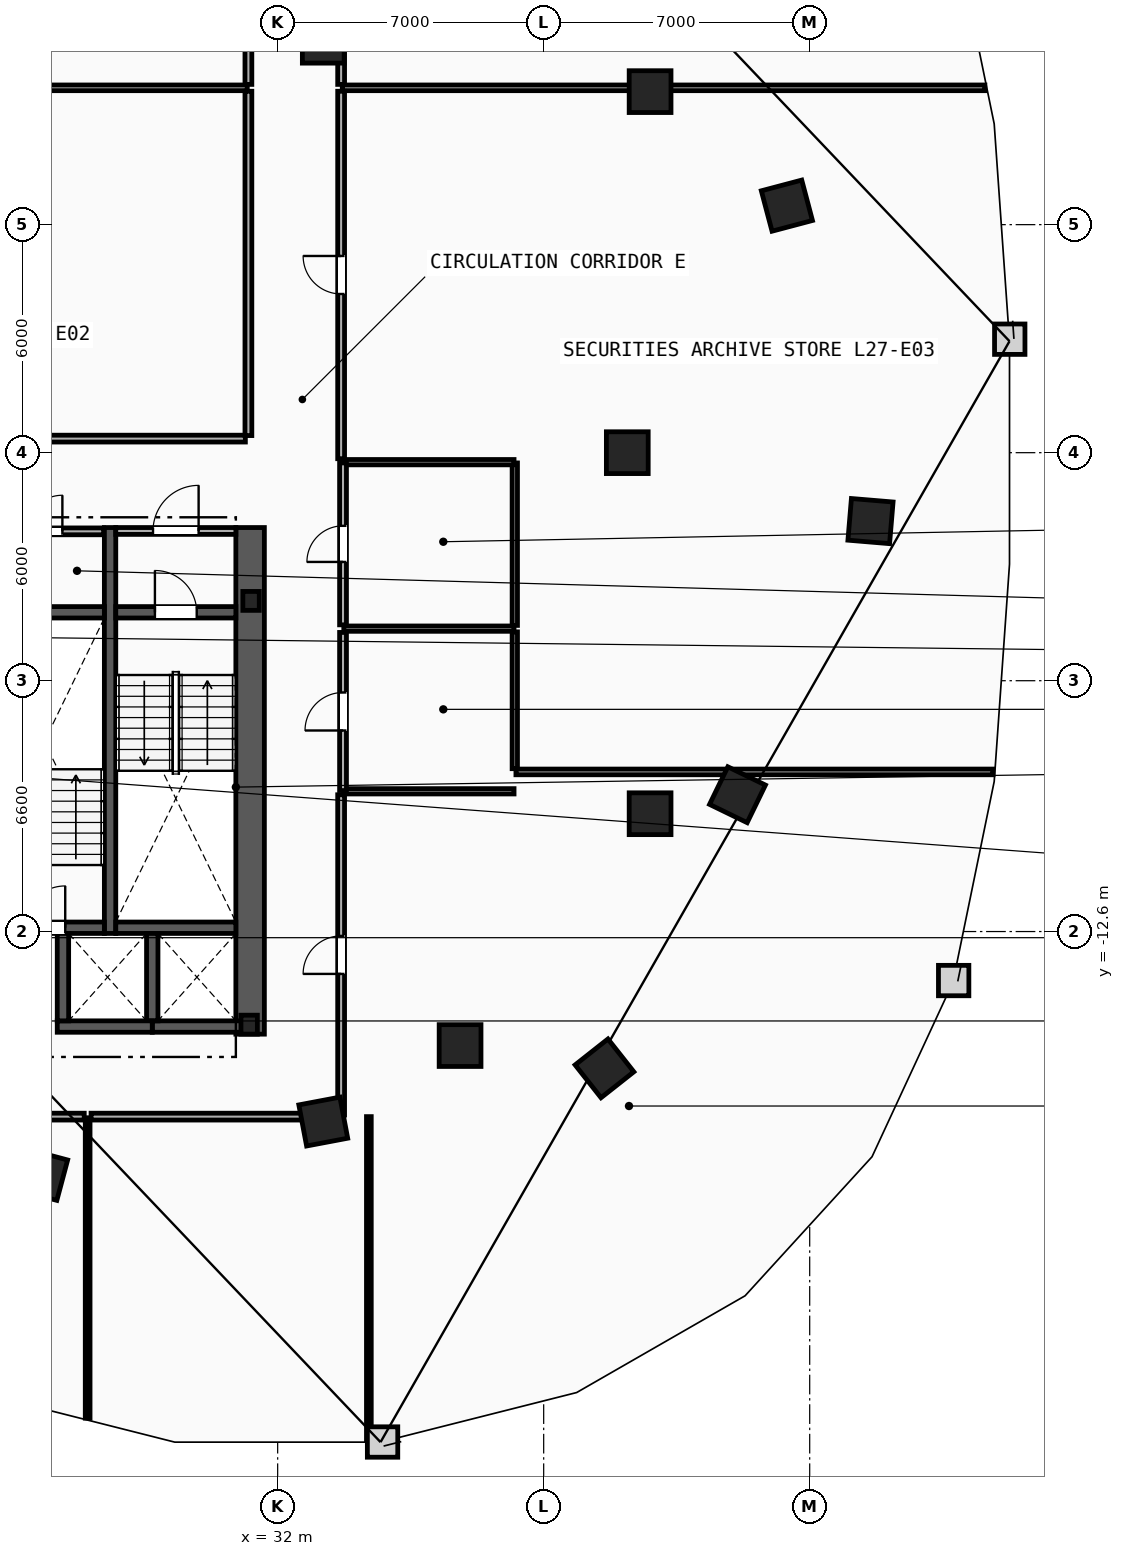
"""IFC4 building model, lengths in metres.
Left out: names, types, materials, properties, quantities, classifications, styles, units other than length and angle.
Written with IfcOpenShell. Run it as: python <this file> out.ifc"""

import sys

from ifc_helpers import new_model, si_unit, direction, frame, frame_2d, origin, origin_2d, place, context, subcontext, project, spatial, rectangle, i_section, extrude, element, fill, save


model = new_model("IFC4")
c1 = context("Model", 3, precision=1e-05, world=origin(), true_north=direction((0.0, 1.0)))
c2 = subcontext(c1, "Body", "Model", "MODEL_VIEW")
j1 = project(units=[si_unit("LENGTHUNIT", "METRE"), si_unit("PLANEANGLEUNIT", "RADIAN")], contexts=[c1])
p1 = place(None, origin())
s1 = spatial("IfcSite", under=j1, at=p1, CompositionType="ELEMENT")
p2 = place(p1, origin())
s2 = spatial("IfcBuilding", under=s1, at=p2, CompositionType="ELEMENT")
p3 = place(p2, frame((0.0, 0.0, 107.0)))
s3 = spatial("IfcBuildingStorey", under=s2, at=p3, CompositionType="ELEMENT", Elevation=107.0)
for number, where, z_axis, x_axis in (
    (1, (31.3, -3.9, 0.0), (0.0, 0.0, 1.0), (1.0, 0.0, 0.0)),
    (2, (31.25, -15.05, 0.0), (0.0, 0.0, 1.0), (1.0, 0.0, 0.0)),
):
    element("IfcColumn", number, at=place(p3, frame(where, z_axis=z_axis, x_axis=x_axis)), inside=s3, PredefinedType="COLUMN", context=c2, shape_type="SweptSolid", body=[
        extrude(i_section(OverallWidth=0.432, OverallDepth=0.498, WebThickness=0.056, FlangeThickness=0.089, FilletRadius=0.018, at=origin_2d()), origin(), (0.0, 0.0, 1.0), 3.6),
    ])
for number, where, z_axis, x_axis in (
    (3, (41.2, 0.0, 0.0), (0.0, 0.0, 1.0), (1.0, 0.0, 0.0)),
    (4, (41.8, -9.5, 0.0), (0.0, 0.0, 1.0), (1.0, 0.0, 0.0)),
    (5, (36.8, -15.6, 0.0), (0.0, 0.0, 1.0), (1.0, 0.0, 0.0)),
    (6, (41.8, 9.5, 0.0), (0.0, 0.0, 1.0), (1.0, 0.0, 0.0)),
    (7, (33.2, 10.8, 0.0), (0.0, 0.0, 1.0), (1.0, 0.0, 0.0)),
    (8, (25.8, -19.0, 0.0), (0.0, 0.0, 1.0), (0.966, -0.259, 0.0)),
    (9, (33.2, -17.6, 0.0), (0.0, 0.0, 1.0), (0.983, 0.186, 0.0)),
    (10, (40.6, -16.2, 0.0), (0.0, 0.0, 1.0), (0.785, 0.619, 0.0)),
    (11, (44.1, -9.0, 0.0), (0.0, 0.0, 1.0), (0.437, 0.899, 0.0)),
    (12, (47.6, -1.8, 0.0), (0.0, 0.0, 1.0), (0.084, 0.997, 0.0)),
    (13, (45.4, 6.5, 0.0), (0.0, 0.0, 1.0), (-0.256, 0.967, 0.0)),
):
    element("IfcColumn", number, at=place(p3, frame(where, z_axis=z_axis, x_axis=x_axis)), inside=s3, PredefinedType="COLUMN", context=c2, shape_type="SweptSolid", body=[
        extrude(rectangle(XDim=1.1, YDim=1.1, at=origin_2d()), origin(), (0.0, 0.0, 1.0), 3.6),
    ])
p4 = place(p3, frame((31.275, -15.3, 0.0), z_axis=(0.0, 0.0, 1.0), x_axis=(0.0, 1.0, 0.0)))
e14 = element("IfcWall", 14, at=p4, inside=s3, PredefinedType="SHEAR", context=c2, shape_type="SweptSolid", body=[
    extrude(rectangle(XDim=13.33, YDim=0.75, at=frame_2d((6.665, 0.0))), origin(), (0.0, 0.0, 1.0), 3.3),
])
p5 = place(p3, frame((27.59, -12.65, 0.0), z_axis=(0.0, 0.0, 1.0), x_axis=(0.0, 1.0, 0.0)))
e15 = element("IfcWall", 15, at=p5, inside=s3, PredefinedType="SHEAR", context=c2, shape_type="SweptSolid", body=[
    extrude(rectangle(XDim=10.68, YDim=0.3, at=frame_2d((5.34, 0.0))), origin(), (0.0, 0.0, 1.0), 3.3),
])
p6 = place(p3, frame((27.74, -4.2, 0.0), z_axis=(0.0, 0.0, 1.0), x_axis=(1.0, 0.0, 0.0)))
e16 = element("IfcWall", 16, at=p6, inside=s3, PredefinedType="SHEAR", context=c2, shape_type="SweptSolid", body=[
    extrude(rectangle(XDim=3.16, YDim=0.3, at=frame_2d((1.58, 0.0))), origin(), (0.0, 0.0, 1.0), 3.3),
])
p7 = place(p6, frame((1.03, 0.0, 0.0)))
e17 = element("IfcOpeningElement", 17, at=p7, cuts=e16, PredefinedType="OPENING", context=c2, shape_type="SweptSolid", body=[
    extrude(rectangle(XDim=1.1, YDim=2.15, at=frame_2d((0.55, 1.075))), frame((0.0, 0.16, 0.0), z_axis=(0.0, -1.0, 0.0), x_axis=(1.0, 0.0, 0.0)), (0.0, 0.0, 1.0), 0.32),
])
p8 = place(p3, frame((27.74, -12.5, 0.0), z_axis=(0.0, 0.0, 1.0), x_axis=(1.0, 0.0, 0.0)))
e18 = element("IfcWall", 18, at=p8, inside=s3, PredefinedType="SHEAR", context=c2, shape_type="SweptSolid", body=[
    extrude(rectangle(XDim=3.16, YDim=0.3, at=frame_2d((1.58, 0.0))), origin(), (0.0, 0.0, 1.0), 3.3),
])
p9 = place(p3, frame((24.28, -12.5, 0.0), z_axis=(0.0, 0.0, 1.0), x_axis=(1.0, 0.0, 0.0)))
e19 = element("IfcWall", 19, at=p9, inside=s3, PredefinedType="SHEAR", context=c2, shape_type="SweptSolid", body=[
    extrude(rectangle(XDim=3.16, YDim=0.3, at=frame_2d((1.58, 0.0))), origin(), (0.0, 0.0, 1.0), 3.3),
])
p10 = place(p9, frame((1.03, 0.0, 0.0)))
e20 = element("IfcOpeningElement", 20, at=p10, cuts=e19, PredefinedType="OPENING", context=c2, shape_type="SweptSolid", body=[
    extrude(rectangle(XDim=1.1, YDim=2.15, at=frame_2d((0.55, 1.075))), frame((0.0, 0.16, 0.0), z_axis=(0.0, -1.0, 0.0), x_axis=(1.0, 0.0, 0.0)), (0.0, 0.0, 1.0), 0.32),
])
p11 = place(p3, frame((24.28, -4.2, 0.0), z_axis=(0.0, 0.0, 1.0), x_axis=(1.0, 0.0, 0.0)))
e21 = element("IfcWall", 21, at=p11, inside=s3, PredefinedType="SHEAR", context=c2, shape_type="SweptSolid", body=[
    extrude(rectangle(XDim=3.16, YDim=0.3, at=frame_2d((1.58, 0.0))), origin(), (0.0, 0.0, 1.0), 3.3),
])
p12 = place(p3, frame((27.74, -2.06, 0.0), z_axis=(0.0, 0.0, 1.0), x_axis=(1.0, 0.0, 0.0)))
e22 = element("IfcWall", 22, at=p12, inside=s3, PredefinedType="PARTITIONING", context=c2, shape_type="SweptSolid", body=[
    extrude(rectangle(XDim=3.16, YDim=0.18, at=frame_2d((1.58, 0.0))), origin(), (0.0, 0.0, 1.0), 3.3),
])
p13 = place(p12, frame((0.98, 0.0, 0.0)))
e23 = element("IfcOpeningElement", 23, at=p13, cuts=e22, PredefinedType="OPENING", context=c2, shape_type="SweptSolid", body=[
    extrude(rectangle(XDim=1.2, YDim=2.15, at=frame_2d((0.6, 1.075))), frame((0.0, 0.1, 0.0), z_axis=(0.0, -1.0, 0.0), x_axis=(1.0, 0.0, 0.0)), (0.0, 0.0, 1.0), 0.2),
])
p14 = place(p3, frame((28.7, -15.1, 0.0), z_axis=(0.0, 0.0, 1.0), x_axis=(1.0, 0.0, 0.0)))
e24 = element("IfcWall", 24, at=p14, inside=s3, PredefinedType="SHEAR", context=c2, shape_type="SweptSolid", body=[
    extrude(rectangle(XDim=2.5, YDim=0.3, at=frame_2d((1.25, 0.0))), origin(), (0.0, 0.0, 1.0), 3.3),
])
p15 = place(p3, frame((28.7, -14.95, 0.0), z_axis=(0.0, 0.0, 1.0), x_axis=(0.0, 1.0, 0.0)))
e25 = element("IfcWall", 25, at=p15, inside=s3, PredefinedType="SHEAR", context=c2, shape_type="SweptSolid", body=[
    extrude(rectangle(XDim=2.3, YDim=0.3, at=frame_2d((1.15, 0.0))), origin(), (0.0, 0.0, 1.0), 3.3),
])
p16 = place(p3, frame((26.2, -15.1, 0.0), z_axis=(0.0, 0.0, 1.0), x_axis=(1.0, 0.0, 0.0)))
e26 = element("IfcWall", 26, at=p16, inside=s3, PredefinedType="SHEAR", context=c2, shape_type="SweptSolid", body=[
    extrude(rectangle(XDim=2.5, YDim=0.3, at=frame_2d((1.25, 0.0))), origin(), (0.0, 0.0, 1.0), 3.3),
])
p17 = place(p3, frame((26.35, -14.95, 0.0), z_axis=(0.0, 0.0, 1.0), x_axis=(0.0, 1.0, 0.0)))
e27 = element("IfcWall", 27, at=p17, inside=s3, PredefinedType="SHEAR", context=c2, shape_type="SweptSolid", body=[
    extrude(rectangle(XDim=2.3, YDim=0.3, at=frame_2d((1.15, 0.0))), origin(), (0.0, 0.0, 1.0), 3.3),
])
p18 = place(p3, frame((24.3, -2.07, 0.0), z_axis=(0.0, 0.0, 1.0), x_axis=(1.0, 0.0, 0.0)))
e28 = element("IfcWall", 28, at=p18, inside=s3, PredefinedType="PARTITIONING", context=c2, shape_type="SweptSolid", body=[
    extrude(rectangle(XDim=3.12, YDim=0.18, at=frame_2d((1.56, 0.0))), origin(), (0.0, 0.0, 1.0), 3.3),
])
p19 = place(p18, frame((1.085, 0.0, 0.0)))
e29 = element("IfcOpeningElement", 29, at=p19, cuts=e28, PredefinedType="OPENING", context=c2, shape_type="SweptSolid", body=[
    extrude(rectangle(XDim=0.95, YDim=2.1, at=frame_2d((0.475, 1.05))), frame((0.0, 0.1, 0.0), z_axis=(0.0, -1.0, 0.0), x_axis=(1.0, 0.0, 0.0)), (0.0, 0.0, 1.0), 0.2),
])
p20 = place(p3, frame((38.24, -8.315, 0.0), z_axis=(0.0, 0.0, 1.0), x_axis=(0.0, 1.0, 0.0)))
e30 = element("IfcWall", 30, at=p20, inside=s3, PredefinedType="PARTITIONING", context=c2, shape_type="SweptSolid", body=[
    extrude(rectangle(XDim=3.6, YDim=0.14, at=frame_2d((1.8, 0.0))), origin(), (0.0, 0.0, 1.0), 3.3),
])
p21 = place(p3, frame((38.24, -4.545, 0.0), z_axis=(0.0, 0.0, 1.0), x_axis=(0.0, 1.0, 0.0)))
e31 = element("IfcWall", 31, at=p21, inside=s3, PredefinedType="PARTITIONING", context=c2, shape_type="SweptSolid", body=[
    extrude(rectangle(XDim=4.275, YDim=0.14, at=frame_2d((2.137, 0.0))), origin(), (0.0, 0.0, 1.0), 3.3),
])
for number, where, z_axis, x_axis in (
    (32, (33.74, -0.25, 0.0), (0.0, 0.0, 1.0), (1.0, 0.0, 0.0)),
    (33, (33.74, -4.63, 0.0), (0.0, 0.0, 1.0), (1.0, 0.0, 0.0)),
    (34, (33.74, -8.91, 0.0), (0.0, 0.0, 1.0), (1.0, 0.0, 0.0)),
):
    element("IfcWall", number, at=place(p3, frame(where, z_axis=z_axis, x_axis=x_axis)), inside=s3, PredefinedType="PARTITIONING", context=c2, shape_type="SweptSolid", body=[
        extrude(rectangle(XDim=4.48, YDim=0.14, at=frame_2d((2.24, 0.0))), origin(), (0.0, 0.0, 1.0), 3.3),
    ])
p22 = place(p3, frame((33.72, -4.53, 0.0), z_axis=(0.0, 0.0, 1.0), x_axis=(0.0, 1.0, 0.0)))
e35 = element("IfcWall", 35, at=p22, inside=s3, PredefinedType="PARTITIONING", context=c2, shape_type="SweptSolid", body=[
    extrude(rectangle(XDim=4.26, YDim=0.18, at=frame_2d((2.13, 0.0))), origin(), (0.0, 0.0, 1.0), 3.3),
])
p23 = place(p22, frame((1.655, 0.0, 0.0)))
e36 = element("IfcOpeningElement", 36, at=p23, cuts=e35, PredefinedType="OPENING", context=c2, shape_type="SweptSolid", body=[
    extrude(rectangle(XDim=0.95, YDim=2.1, at=frame_2d((0.475, 1.05))), frame((0.0, 0.1, 0.0), z_axis=(0.0, -1.0, 0.0), x_axis=(1.0, 0.0, 0.0)), (0.0, 0.0, 1.0), 0.2),
])
p24 = place(p3, frame((33.72, -8.89, 0.0), z_axis=(0.0, 0.0, 1.0), x_axis=(0.0, 1.0, 0.0)))
e37 = element("IfcWall", 37, at=p24, inside=s3, PredefinedType="PARTITIONING", context=c2, shape_type="SweptSolid", body=[
    extrude(rectangle(XDim=4.16, YDim=0.18, at=frame_2d((2.08, 0.0))), origin(), (0.0, 0.0, 1.0), 3.3),
])
p25 = place(p24, frame((1.58, 0.0, 0.0)))
e38 = element("IfcOpeningElement", 38, at=p25, cuts=e37, PredefinedType="OPENING", context=c2, shape_type="SweptSolid", body=[
    extrude(rectangle(XDim=1.0, YDim=2.15, at=frame_2d((0.5, 1.075))), frame((0.0, 0.1, 0.0), z_axis=(0.0, -1.0, 0.0), x_axis=(1.0, 0.0, 0.0)), (0.0, 0.0, 1.0), 0.2),
])
p26 = place(p3, frame((13.39, 9.6, 0.0), z_axis=(0.0, 0.0, 1.0), x_axis=(1.0, 0.0, 0.0)))
e39 = element("IfcWall", 39, at=p26, inside=s3, PredefinedType="PARTITIONING", context=c2, shape_type="SweptSolid", body=[
    extrude(rectangle(XDim=17.81, YDim=0.15, at=frame_2d((8.905, 0.0))), origin(), (0.0, 0.0, 1.0), 2.605),
])
p27 = place(p3, frame((33.7, 9.6, 0.0), z_axis=(0.0, 0.0, 1.0), x_axis=(1.0, 0.0, 0.0)))
e40 = element("IfcWall", 40, at=p27, inside=s3, PredefinedType="PARTITIONING", context=c2, shape_type="SweptSolid", body=[
    extrude(rectangle(XDim=16.91, YDim=0.15, at=frame_2d((8.455, 0.0))), origin(), (0.0, 0.0, 1.0), 2.605),
])
p28 = place(p3, frame((38.27, -8.4, 0.0), z_axis=(0.0, 0.0, 1.0), x_axis=(1.0, 0.0, 0.0)))
e41 = element("IfcWall", 41, at=p28, inside=s3, PredefinedType="PARTITIONING", context=c2, shape_type="SweptSolid", body=[
    extrude(rectangle(XDim=12.553, YDim=0.15, at=frame_2d((6.276, 0.0))), origin(), (0.0, 0.0, 1.0), 3.3),
])
p29 = place(p3, frame((27.0, -25.404, 0.0), z_axis=(0.0, 0.0, 1.0), x_axis=(0.0, 1.0, 0.0)))
e42 = element("IfcWall", 42, at=p29, inside=s3, PredefinedType="PARTITIONING", context=c2, shape_type="SweptSolid", body=[
    extrude(rectangle(XDim=7.904, YDim=0.125, at=frame_2d((3.952, 0.0))), origin(), (0.0, 0.0, 1.0), 3.3),
])
p30 = place(p3, frame((34.4, -25.985, 0.0), z_axis=(0.0, 0.0, 1.0), x_axis=(0.0, 1.0, 0.0)))
e43 = element("IfcWall", 43, at=p30, inside=s3, PredefinedType="PARTITIONING", context=c2, shape_type="SweptSolid", body=[
    extrude(rectangle(XDim=8.515, YDim=0.125, at=frame_2d((4.258, 0.0))), origin(), (0.0, 0.0, 1.0), 3.3),
])
p31 = place(p3, frame((33.67, -17.428, 0.0), z_axis=(0.0, 0.0, 1.0), x_axis=(0.0, 1.0, 0.0)))
e44 = element("IfcWall", 44, at=p31, inside=s3, PredefinedType="PARTITIONING", context=c2, shape_type="SweptSolid", body=[
    extrude(rectangle(XDim=8.427, YDim=0.18, at=frame_2d((4.213, 0.0))), origin(), (0.0, 0.0, 1.0), 3.3),
])
p32 = place(p31, frame((3.713, 0.0, 0.0)))
e45 = element("IfcOpeningElement", 45, at=p32, cuts=e44, PredefinedType="OPENING", context=c2, shape_type="SweptSolid", body=[
    extrude(rectangle(XDim=1.0, YDim=2.15, at=frame_2d((0.5, 1.075))), frame((0.0, 0.1, 0.0), z_axis=(0.0, -1.0, 0.0), x_axis=(1.0, 0.0, 0.0)), (0.0, 0.0, 1.0), 0.2),
])
p33 = place(p3, frame((27.09, -17.47, 0.0), z_axis=(0.0, 0.0, 1.0), x_axis=(1.0, 0.0, 0.0)))
e46 = element("IfcWall", 46, at=p33, inside=s3, PredefinedType="PARTITIONING", context=c2, shape_type="SweptSolid", body=[
    extrude(rectangle(XDim=6.538, YDim=0.18, at=frame_2d((3.269, 0.0))), origin(), (0.0, 0.0, 1.0), 3.3),
])
p34 = place(p3, frame((31.15, 0.37, 0.0), z_axis=(0.0, 0.0, 1.0), x_axis=(-1.0, 0.0, 0.0)))
e47 = element("IfcWall", 47, at=p34, inside=s3, PredefinedType="PARTITIONING", context=c2, shape_type="SweptSolid", body=[
    extrude(rectangle(XDim=14.328, YDim=0.18, at=frame_2d((7.164, 0.0))), origin(), (0.0, 0.0, 1.0), 3.3),
])
p35 = place(p34, frame((6.664, 0.0, 0.0)))
e48 = element("IfcOpeningElement", 48, at=p35, cuts=e47, PredefinedType="OPENING", context=c2, shape_type="SweptSolid", body=[
    extrude(rectangle(XDim=1.0, YDim=2.15, at=frame_2d((0.5, 1.075))), frame((0.0, 0.1, 0.0), z_axis=(0.0, -1.0, 0.0), x_axis=(1.0, 0.0, 0.0)), (0.0, 0.0, 1.0), 0.2),
])
p36 = place(p3, frame((16.822, -17.47, 0.0), z_axis=(0.0, 0.0, 1.0), x_axis=(1.0, 0.0, 0.0)))
e49 = element("IfcWall", 49, at=p36, inside=s3, PredefinedType="PARTITIONING", context=c2, shape_type="SweptSolid", body=[
    extrude(rectangle(XDim=10.088, YDim=0.18, at=frame_2d((5.044, 0.0))), origin(), (0.0, 0.0, 1.0), 3.3),
])
p37 = place(p3, frame((31.23, 9.51, 0.0), z_axis=(0.0, 0.0, 1.0), x_axis=(0.0, -1.0, 0.0)))
e50 = element("IfcWall", 50, at=p37, inside=s3, PredefinedType="PARTITIONING", context=c2, shape_type="SweptSolid", body=[
    extrude(rectangle(XDim=9.06, YDim=0.18, at=frame_2d((4.53, 0.0))), origin(), (0.0, 0.0, 1.0), 3.3),
])
p38 = place(p3, frame((33.67, -0.159, 0.0), z_axis=(0.0, 0.0, 1.0), x_axis=(0.0, 1.0, 0.0)))
e51 = element("IfcWall", 51, at=p38, inside=s3, PredefinedType="PARTITIONING", context=c2, shape_type="SweptSolid", body=[
    extrude(rectangle(XDim=9.669, YDim=0.18, at=frame_2d((4.834, 0.0))), origin(), (0.0, 0.0, 1.0), 3.3),
])
p39 = place(p38, frame((4.334, 0.0, 0.0)))
e52 = element("IfcOpeningElement", 52, at=p39, cuts=e51, PredefinedType="OPENING", context=c2, shape_type="SweptSolid", body=[
    extrude(rectangle(XDim=1.0, YDim=2.15, at=frame_2d((0.5, 1.075))), frame((0.0, 0.1, 0.0), z_axis=(0.0, -1.0, 0.0), x_axis=(1.0, 0.0, 0.0)), (0.0, 0.0, 1.0), 0.2),
])
for number, where, z_axis, x_axis in (
    (53, (33.67, 9.69, 0.0), (0.0, 0.0, 1.0), (0.0, 1.0, 0.0)),
    (54, (31.23, 11.4, 0.0), (0.0, 0.0, 1.0), (0.0, -1.0, 0.0)),
):
    element("IfcWall", number, at=place(p3, frame(where, z_axis=z_axis, x_axis=x_axis)), inside=s3, PredefinedType="PARTITIONING", context=c2, shape_type="SweptSolid", body=[
        extrude(rectangle(XDim=1.71, YDim=0.18, at=frame_2d((0.855, 0.0))), origin(), (0.0, 0.0, 1.0), 3.3),
    ])
p40 = place(p7, origin())
e55 = element("IfcDoor", 55, at=p40, inside=s3, OperationType="SINGLE_SWING_LEFT", PredefinedType="DOOR", context=c2, shape_type="SweptSolid", body=[
    extrude(rectangle(XDim=1.1, YDim=2.15, at=frame_2d((0.55, 1.075))), frame((0.0, 0.025, 0.0), z_axis=(0.0, -1.0, 0.0), x_axis=(1.0, 0.0, 0.0)), (0.0, 0.0, 1.0), 0.05),
])
fill(e17, e55)
p41 = place(p10, origin())
e56 = element("IfcDoor", 56, at=p41, inside=s3, OperationType="SINGLE_SWING_RIGHT", PredefinedType="DOOR", context=c2, shape_type="SweptSolid", body=[
    extrude(rectangle(XDim=1.1, YDim=2.15, at=frame_2d((0.55, 1.075))), frame((0.0, 0.025, 0.0), z_axis=(0.0, -1.0, 0.0), x_axis=(1.0, 0.0, 0.0)), (0.0, 0.0, 1.0), 0.05),
])
fill(e20, e56)
p42 = place(p13, origin())
e57 = element("IfcDoor", 57, at=p42, inside=s3, OperationType="SINGLE_SWING_RIGHT", PredefinedType="DOOR", context=c2, shape_type="SweptSolid", body=[
    extrude(rectangle(XDim=1.2, YDim=2.15, at=frame_2d((0.6, 1.075))), frame((0.0, 0.025, 0.0), z_axis=(0.0, -1.0, 0.0), x_axis=(1.0, 0.0, 0.0)), (0.0, 0.0, 1.0), 0.05),
])
fill(e23, e57)
p43 = place(p39, origin())
e58 = element("IfcDoor", 58, at=p43, inside=s3, OperationType="SINGLE_SWING_RIGHT", PredefinedType="DOOR", context=c2, shape_type="SweptSolid", body=[
    extrude(rectangle(XDim=1.0, YDim=2.15, at=frame_2d((0.5, 1.075))), frame((0.0, 0.025, 0.0), z_axis=(0.0, -1.0, 0.0), x_axis=(1.0, 0.0, 0.0)), (0.0, 0.0, 1.0), 0.05),
])
fill(e52, e58)
p44 = place(p32, origin())
e59 = element("IfcDoor", 59, at=p44, inside=s3, OperationType="SINGLE_SWING_LEFT", PredefinedType="DOOR", context=c2, shape_type="SweptSolid", body=[
    extrude(rectangle(XDim=1.0, YDim=2.15, at=frame_2d((0.5, 1.075))), frame((0.0, 0.025, 0.0), z_axis=(0.0, -1.0, 0.0), x_axis=(1.0, 0.0, 0.0)), (0.0, 0.0, 1.0), 0.05),
])
fill(e45, e59)
p45 = place(p23, origin())
e60 = element("IfcDoor", 60, at=p45, inside=s3, OperationType="SINGLE_SWING_LEFT", PredefinedType="DOOR", context=c2, shape_type="SweptSolid", body=[
    extrude(rectangle(XDim=0.95, YDim=2.1, at=frame_2d((0.475, 1.05))), frame((0.0, 0.025, 0.0), z_axis=(0.0, -1.0, 0.0), x_axis=(1.0, 0.0, 0.0)), (0.0, 0.0, 1.0), 0.05),
])
fill(e36, e60)
p46 = place(p25, origin())
e61 = element("IfcDoor", 61, at=p46, inside=s3, OperationType="SINGLE_SWING_LEFT", PredefinedType="DOOR", context=c2, shape_type="SweptSolid", body=[
    extrude(rectangle(XDim=1.0, YDim=2.15, at=frame_2d((0.5, 1.075))), frame((0.0, 0.025, 0.0), z_axis=(0.0, -1.0, 0.0), x_axis=(1.0, 0.0, 0.0)), (0.0, 0.0, 1.0), 0.05),
])
fill(e38, e61)
p47 = place(p19, origin())
e62 = element("IfcDoor", 62, at=p47, inside=s3, OperationType="SINGLE_SWING_RIGHT", PredefinedType="DOOR", context=c2, shape_type="SweptSolid", body=[
    extrude(rectangle(XDim=0.95, YDim=2.1, at=frame_2d((0.475, 1.05))), frame((0.0, 0.025, 0.0), z_axis=(0.0, -1.0, 0.0), x_axis=(1.0, 0.0, 0.0)), (0.0, 0.0, 1.0), 0.05),
])
fill(e29, e62)
save(model, sys.argv[1])
